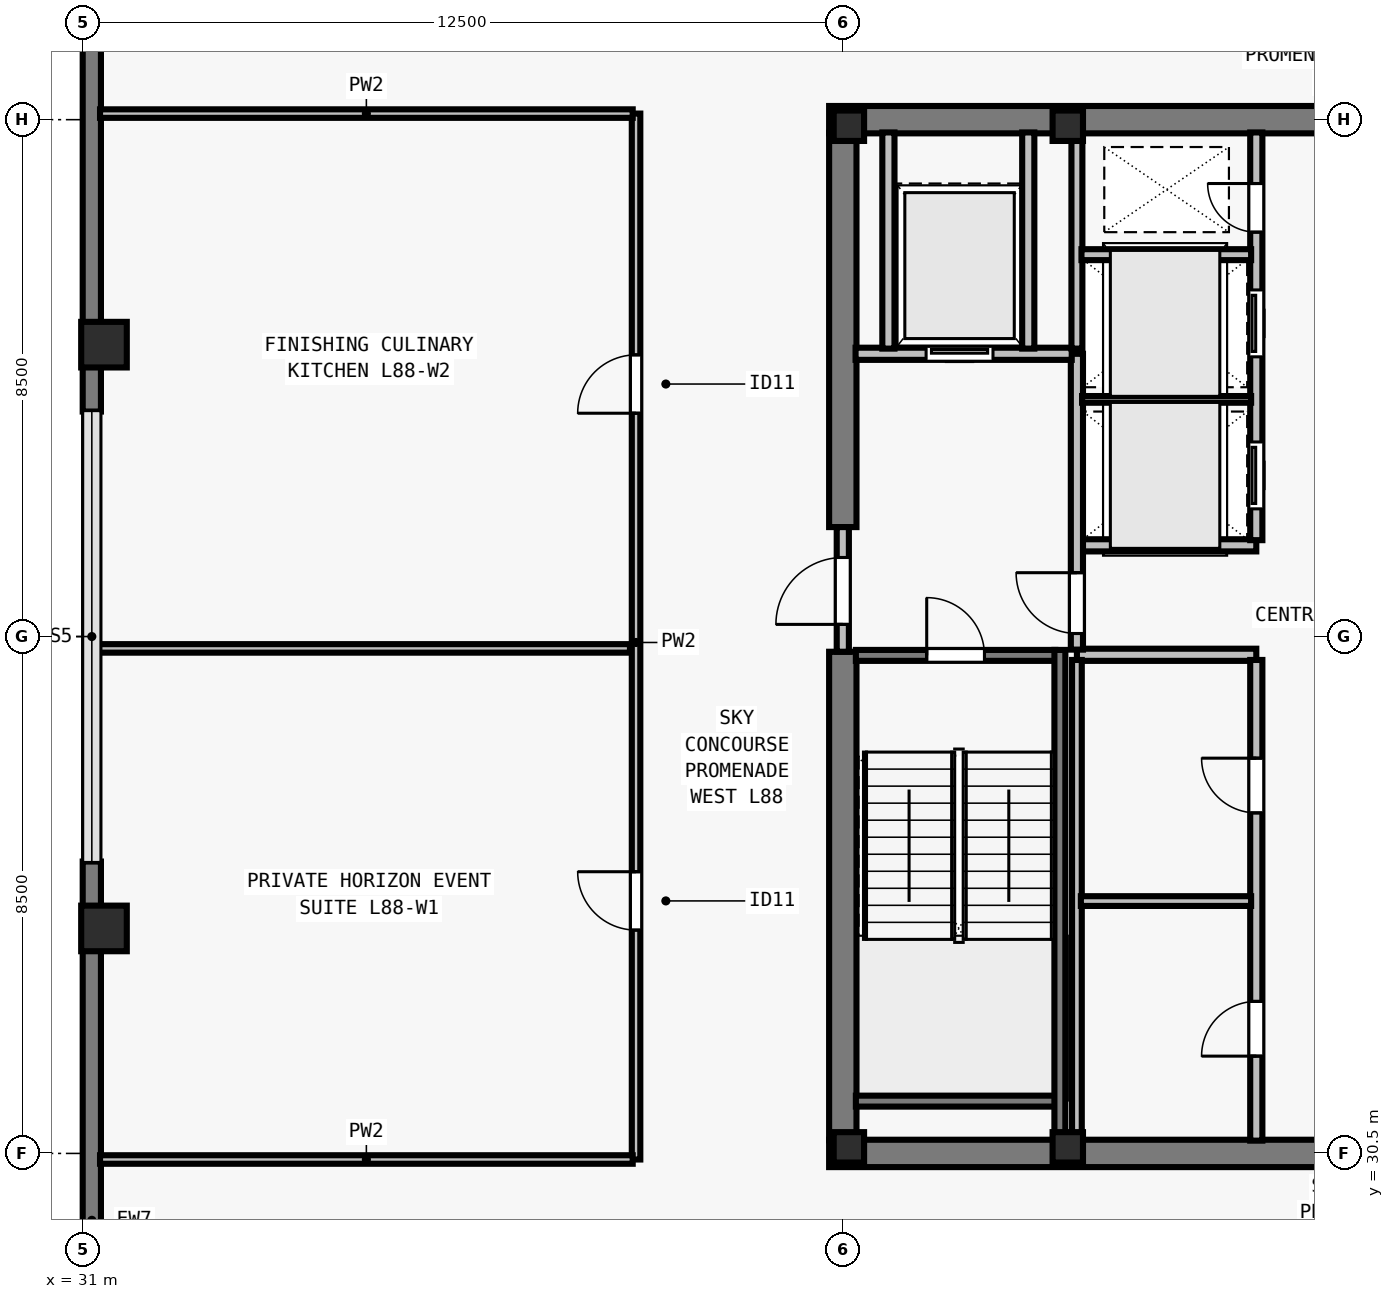
"""IFC4 building model, lengths in metres.
Left out: names, types, materials, properties, quantities, classifications, styles, units other than length and angle.
Written with IfcOpenShell. Run it as: python <this file> out.ifc"""

import sys

from ifc_helpers import new_model, si_unit, direction, frame, frame_2d, origin, origin_2d, place, context, subcontext, project, spatial, rectangle, i_section, extrude, element, fill, save


model = new_model("IFC4")
c1 = context("Model", 3, precision=1e-05, world=origin(), true_north=direction((0.0, 1.0)))
c2 = subcontext(c1, "Body", "Model", "MODEL_VIEW")
j1 = project(units=[si_unit("LENGTHUNIT", "METRE"), si_unit("PLANEANGLEUNIT", "RADIAN")], contexts=[c1])
p1 = place(None, origin())
s1 = spatial("IfcSite", under=j1, at=p1, CompositionType="ELEMENT")
p2 = place(p1, origin())
s2 = spatial("IfcBuilding", under=s1, at=p2, CompositionType="ELEMENT")
p3 = place(p2, frame((0.0, 0.0, 320.0)))
s3 = spatial("IfcBuildingStorey", under=s2, at=p3, CompositionType="ELEMENT", Elevation=320.0)
for number, where, z_axis, x_axis in (
    (1, (43.6, 30.6, 0.0), (0.0, 0.0, 1.0), (1.0, 0.0, 0.0)),
    (2, (47.2, 30.6, 0.0), (0.0, 0.0, 1.0), (1.0, 0.0, 0.0)),
    (3, (43.6, 47.4, 0.0), (0.0, 0.0, 1.0), (1.0, 0.0, 0.0)),
    (4, (47.2, 47.4, 0.0), (0.0, 0.0, 1.0), (1.0, 0.0, 0.0)),
):
    element("IfcColumn", number, at=place(p3, frame(where, z_axis=z_axis, x_axis=x_axis)), inside=s3, PredefinedType="COLUMN", context=c2, shape_type="SweptSolid", body=[
        extrude(i_section(OverallWidth=0.5, OverallDepth=0.5, WebThickness=0.028, FlangeThickness=0.045, at=origin_2d()), origin(), (0.0, 0.0, 1.0), 4.5),
    ])
for number, where, z_axis, x_axis in (
    (5, (31.35, 43.8, 0.0), (0.0, 0.0, 1.0), (0.0, 1.0, 0.0)),
    (6, (31.35, 34.2, 0.0), (0.0, 0.0, 1.0), (0.0, 1.0, 0.0)),
):
    element("IfcColumn", number, at=place(p3, frame(where, z_axis=z_axis, x_axis=x_axis)), inside=s3, PredefinedType="COLUMN", context=c2, shape_type="SweptSolid", body=[
        extrude(rectangle(XDim=0.75, YDim=0.75, at=origin_2d()), origin(), (0.0, 0.0, 1.0), 4.5),
    ])
p4 = place(p3, frame((31.15, 23.5, 0.0), z_axis=(0.0, 0.0, 1.0), x_axis=(0.0, 1.0, 0.0)))
e7 = element("IfcWall", 7, at=p4, inside=s3, PredefinedType="SOLIDWALL", context=c2, shape_type="SweptSolid", body=[
    extrude(rectangle(XDim=11.8, YDim=0.3, at=frame_2d((5.9, 0.0))), origin(), (0.0, 0.0, 1.0), 4.25),
])
p5 = place(p3, frame((31.15, 42.7, 0.0), z_axis=(0.0, 0.0, 1.0), x_axis=(0.0, 1.0, 0.0)))
e8 = element("IfcWall", 8, at=p5, inside=s3, PredefinedType="SOLIDWALL", context=c2, shape_type="SweptSolid", body=[
    extrude(rectangle(XDim=11.522, YDim=0.3, at=frame_2d((5.761, 0.0))), origin(), (0.0, 0.0, 1.0), 4.25),
])
for number, where, z_axis, x_axis in (
    (9, (43.275, 30.5, 0.0), (0.0, 0.0, 1.0), (1.0, 0.0, 0.0)),
    (10, (43.275, 47.5, 0.0), (0.0, 0.0, 1.0), (1.0, 0.0, 0.0)),
):
    element("IfcWall", number, at=place(p3, frame(where, z_axis=z_axis, x_axis=x_axis)), inside=s3, PredefinedType="SHEAR", context=c2, shape_type="SweptSolid", body=[
        extrude(rectangle(XDim=17.45, YDim=0.45, at=frame_2d((8.725, 0.0))), origin(), (0.0, 0.0, 1.0), 4.25),
    ])
p6 = place(p3, frame((43.5, 30.715, 0.0), z_axis=(0.0, 0.0, 1.0), x_axis=(0.0, 1.0, 0.0)))
e11 = element("IfcWall", 11, at=p6, inside=s3, PredefinedType="SHEAR", context=c2, shape_type="SweptSolid", body=[
    extrude(rectangle(XDim=8.035, YDim=0.45, at=frame_2d((4.018, 0.0))), origin(), (0.0, 0.0, 1.0), 4.25),
])
p7 = place(p3, frame((43.5, 40.8, 0.0), z_axis=(0.0, 0.0, 1.0), x_axis=(0.0, 1.0, 0.0)))
e12 = element("IfcWall", 12, at=p7, inside=s3, PredefinedType="SHEAR", context=c2, shape_type="SweptSolid", body=[
    extrude(rectangle(XDim=6.485, YDim=0.45, at=frame_2d((3.242, 0.0))), origin(), (0.0, 0.0, 1.0), 4.25),
])
for number, where, z_axis, x_axis in (
    (13, (47.35, 38.7, 0.0), (0.0, 0.0, 1.0), (1.0, 0.0, 0.0)),
    (14, (47.35, 40.5, 0.0), (0.0, 0.0, 1.0), (1.0, 0.0, 0.0)),
):
    element("IfcWall", number, at=place(p3, frame(where, z_axis=z_axis, x_axis=x_axis)), inside=s3, PredefinedType="SOLIDWALL", context=c2, shape_type="SweptSolid", body=[
        extrude(rectangle(XDim=2.95, YDim=0.2, at=frame_2d((1.475, 0.0))), origin(), (0.0, 0.0, 1.0), 4.25),
    ])
p8 = place(p3, frame((50.3, 30.71, 0.0), z_axis=(0.0, 0.0, 1.0), x_axis=(0.0, 1.0, 0.0)))
e15 = element("IfcWall", 15, at=p8, inside=s3, PredefinedType="SOLIDWALL", context=c2, shape_type="SweptSolid", body=[
    extrude(rectangle(XDim=7.905, YDim=0.2, at=frame_2d((3.953, 0.0))), origin(), (0.0, 0.0, 1.0), 4.25),
])
p9 = place(p8, frame((1.39, 0.0, 0.0)))
e16 = element("IfcOpeningElement", 16, at=p9, cuts=e15, PredefinedType="OPENING", context=c2, shape_type="SweptSolid", body=[
    extrude(rectangle(XDim=0.9, YDim=2.12, at=frame_2d((0.45, 1.06))), frame((0.0, 0.11, 0.0), z_axis=(0.0, -1.0, 0.0), x_axis=(1.0, 0.0, 0.0)), (0.0, 0.0, 1.0), 0.22),
])
p10 = place(p8, frame((5.39, 0.0, 0.0)))
e17 = element("IfcOpeningElement", 17, at=p10, cuts=e15, PredefinedType="OPENING", context=c2, shape_type="SweptSolid", body=[
    extrude(rectangle(XDim=0.9, YDim=2.12, at=frame_2d((0.45, 1.06))), frame((0.0, 0.11, 0.0), z_axis=(0.0, -1.0, 0.0), x_axis=(1.0, 0.0, 0.0)), (0.0, 0.0, 1.0), 0.22),
])
p11 = place(p3, frame((50.3, 40.585, 0.0), z_axis=(0.0, 0.0, 1.0), x_axis=(0.0, 1.0, 0.0)))
e18 = element("IfcWall", 18, at=p11, inside=s3, PredefinedType="SOLIDWALL", context=c2, shape_type="SweptSolid", body=[
    extrude(rectangle(XDim=6.705, YDim=0.2, at=frame_2d((3.353, 0.0))), origin(), (0.0, 0.0, 1.0), 4.25),
])
p12 = place(p11, frame((0.515, 0.0, 0.0)))
e19 = element("IfcOpeningElement", 19, at=p12, cuts=e18, PredefinedType="OPENING", context=c2, shape_type="SweptSolid", body=[
    extrude(rectangle(XDim=1.1, YDim=2.2, at=frame_2d((0.55, 1.1))), frame((0.0, 0.11, 0.0), z_axis=(0.0, -1.0, 0.0), x_axis=(1.0, 0.0, 0.0)), (0.0, 0.0, 1.0), 0.22),
])
p13 = place(p11, frame((3.015, 0.0, 0.0)))
e20 = element("IfcOpeningElement", 20, at=p13, cuts=e18, PredefinedType="OPENING", context=c2, shape_type="SweptSolid", body=[
    extrude(rectangle(XDim=1.1, YDim=2.2, at=frame_2d((0.55, 1.1))), frame((0.0, 0.11, 0.0), z_axis=(0.0, -1.0, 0.0), x_axis=(1.0, 0.0, 0.0)), (0.0, 0.0, 1.0), 0.22),
])
p14 = place(p11, frame((5.065, 0.0, 0.0)))
e21 = element("IfcOpeningElement", 21, at=p14, cuts=e18, PredefinedType="OPENING", context=c2, shape_type="SweptSolid", body=[
    extrude(rectangle(XDim=0.8, YDim=2.08, at=frame_2d((0.4, 1.04))), frame((0.0, 0.11, 0.0), z_axis=(0.0, -1.0, 0.0), x_axis=(1.0, 0.0, 0.0)), (0.0, 0.0, 1.0), 0.22),
])
p15 = place(p3, frame((43.5, 38.75, 0.0), z_axis=(0.0, 0.0, 1.0), x_axis=(0.0, 1.0, 0.0)))
e22 = element("IfcWall", 22, at=p15, inside=s3, PredefinedType="SOLIDWALL", context=c2, shape_type="SweptSolid", body=[
    extrude(rectangle(XDim=2.05, YDim=0.2, at=frame_2d((1.025, 0.0))), origin(), (0.0, 0.0, 1.0), 4.25),
])
p16 = place(p15, frame((0.45, 0.0, 0.0)))
e23 = element("IfcOpeningElement", 23, at=p16, cuts=e22, PredefinedType="OPENING", context=c2, shape_type="SweptSolid", body=[
    extrude(rectangle(XDim=1.1, YDim=2.15, at=frame_2d((0.55, 1.075))), frame((0.0, 0.11, 0.0), z_axis=(0.0, -1.0, 0.0), x_axis=(1.0, 0.0, 0.0)), (0.0, 0.0, 1.0), 0.22),
])
p17 = place(p3, frame((47.35, 38.785, 0.0), z_axis=(0.0, 0.0, 1.0), x_axis=(0.0, 1.0, 0.0)))
e24 = element("IfcWall", 24, at=p17, inside=s3, PredefinedType="SOLIDWALL", context=c2, shape_type="SweptSolid", body=[
    extrude(rectangle(XDim=4.865, YDim=0.2, at=frame_2d((2.433, 0.0))), origin(), (0.0, 0.0, 1.0), 4.25),
])
p18 = place(p17, frame((0.265, 0.0, 0.0)))
e25 = element("IfcOpeningElement", 25, at=p18, cuts=e24, PredefinedType="OPENING", context=c2, shape_type="SweptSolid", body=[
    extrude(rectangle(XDim=1.0, YDim=2.15, at=frame_2d((0.5, 1.075))), frame((0.0, 0.11, 0.0), z_axis=(0.0, -1.0, 0.0), x_axis=(1.0, 0.0, 0.0)), (0.0, 0.0, 1.0), 0.22),
])
p19 = place(p3, frame((43.71, 43.65, 0.0), z_axis=(0.0, 0.0, 1.0), x_axis=(1.0, 0.0, 0.0)))
e26 = element("IfcWall", 26, at=p19, inside=s3, PredefinedType="SOLIDWALL", context=c2, shape_type="SweptSolid", body=[
    extrude(rectangle(XDim=3.555, YDim=0.2, at=frame_2d((1.777, 0.0))), origin(), (0.0, 0.0, 1.0), 4.25),
])
p20 = place(p19, frame((1.16, 0.0, 0.0)))
e27 = element("IfcOpeningElement", 27, at=p20, cuts=e26, PredefinedType="OPENING", context=c2, shape_type="SweptSolid", body=[
    extrude(rectangle(XDim=1.1, YDim=2.2, at=frame_2d((0.55, 1.1))), frame((0.0, 0.11, 0.0), z_axis=(0.0, -1.0, 0.0), x_axis=(1.0, 0.0, 0.0)), (0.0, 0.0, 1.0), 0.22),
])
for number, where, z_axis, x_axis in (
    (28, (46.55, 43.735, 0.0), (0.0, 0.0, 1.0), (0.0, 1.0, 0.0)),
    (29, (44.25, 43.735, 0.0), (0.0, 0.0, 1.0), (0.0, 1.0, 0.0)),
):
    element("IfcWall", number, at=place(p3, frame(where, z_axis=z_axis, x_axis=x_axis)), inside=s3, PredefinedType="SOLIDWALL", context=c2, shape_type="SweptSolid", body=[
        extrude(rectangle(XDim=3.555, YDim=0.2, at=frame_2d((1.777, 0.0))), origin(), (0.0, 0.0, 1.0), 4.25),
    ])
p21 = place(p3, frame((47.35, 30.71, 0.0), z_axis=(0.0, 0.0, 1.0), x_axis=(0.0, 1.0, 0.0)))
e30 = element("IfcWall", 30, at=p21, inside=s3, PredefinedType="PARTITIONING", context=c2, shape_type="SweptSolid", body=[
    extrude(rectangle(XDim=7.905, YDim=0.16, at=frame_2d((3.953, 0.0))), origin(), (0.0, 0.0, 1.0), 4.25),
])
p22 = place(p3, frame((47.415, 34.65, 0.0), z_axis=(0.0, 0.0, 1.0), x_axis=(1.0, 0.0, 0.0)))
e31 = element("IfcWall", 31, at=p22, inside=s3, PredefinedType="PARTITIONING", context=c2, shape_type="SweptSolid", body=[
    extrude(rectangle(XDim=2.8, YDim=0.16, at=frame_2d((1.4, 0.0))), origin(), (0.0, 0.0, 1.0), 4.25),
])
p23 = place(p3, frame((47.35, 43.735, 0.0), z_axis=(0.0, 0.0, 1.0), x_axis=(0.0, 1.0, 0.0)))
e32 = element("IfcWall", 32, at=p23, inside=s3, PredefinedType="SOLIDWALL", context=c2, shape_type="SweptSolid", body=[
    extrude(rectangle(XDim=3.555, YDim=0.18, at=frame_2d((1.777, 0.0))), origin(), (0.0, 0.0, 1.0), 4.25),
])
p24 = place(p3, frame((47.435, 42.9, 0.0), z_axis=(0.0, 0.0, 1.0), x_axis=(1.0, 0.0, 0.0)))
e33 = element("IfcWall", 33, at=p24, inside=s3, PredefinedType="PARTITIONING", context=c2, shape_type="SweptSolid", body=[
    extrude(rectangle(XDim=2.78, YDim=0.11, at=frame_2d((1.39, 0.0))), origin(), (0.0, 0.0, 1.0), 4.25),
])
p25 = place(p3, frame((47.425, 45.28, 0.0), z_axis=(0.0, 0.0, 1.0), x_axis=(1.0, 0.0, 0.0)))
e34 = element("IfcWall", 34, at=p25, inside=s3, PredefinedType="SOLIDWALL", context=c2, shape_type="SweptSolid", body=[
    extrude(rectangle(XDim=2.79, YDim=0.18, at=frame_2d((1.395, 0.0))), origin(), (0.0, 0.0, 1.0), 4.25),
])
p26 = place(p3, frame((40.1, 30.4, 0.0), z_axis=(0.0, 0.0, 1.0), x_axis=(0.0, 1.0, 0.0)))
e35 = element("IfcWall", 35, at=p26, inside=s3, PredefinedType="PARTITIONING", context=c2, shape_type="SweptSolid", body=[
    extrude(rectangle(XDim=17.2, YDim=0.14, at=frame_2d((8.6, 0.0))), origin(), (0.0, 0.0, 1.0), 3.969),
])
p27 = place(p26, frame((3.772, 0.0, 0.0)))
e36 = element("IfcOpeningElement", 36, at=p27, cuts=e35, PredefinedType="OPENING", context=c2, shape_type="SweptSolid", body=[
    extrude(rectangle(XDim=0.96, YDim=2.12, at=frame_2d((0.48, 1.06))), frame((0.0, 0.08, 0.0), z_axis=(0.0, -1.0, 0.0), x_axis=(1.0, 0.0, 0.0)), (0.0, 0.0, 1.0), 0.16),
])
p28 = place(p26, frame((12.272, 0.0, 0.0)))
e37 = element("IfcOpeningElement", 37, at=p28, cuts=e35, PredefinedType="OPENING", context=c2, shape_type="SweptSolid", body=[
    extrude(rectangle(XDim=0.96, YDim=2.12, at=frame_2d((0.48, 1.06))), frame((0.0, 0.08, 0.0), z_axis=(0.0, -1.0, 0.0), x_axis=(1.0, 0.0, 0.0)), (0.0, 0.0, 1.0), 0.16),
])
for number, where, z_axis, x_axis in (
    (38, (31.285, 30.4, 0.0), (0.0, 0.0, 1.0), (1.0, 0.0, 0.0)),
    (39, (31.285, 47.6, 0.0), (0.0, 0.0, 1.0), (1.0, 0.0, 0.0)),
):
    element("IfcWall", number, at=place(p3, frame(where, z_axis=z_axis, x_axis=x_axis)), inside=s3, PredefinedType="PARTITIONING", context=c2, shape_type="SweptSolid", body=[
        extrude(rectangle(XDim=8.76, YDim=0.14, at=frame_2d((4.38, 0.0))), origin(), (0.0, 0.0, 1.0), 2.425),
    ])
p29 = place(p3, frame((31.17, 38.805, 0.0), z_axis=(0.0, 0.0, 1.0), x_axis=(1.0, 0.0, 0.0)))
e40 = element("IfcWall", 40, at=p29, inside=s3, PredefinedType="PARTITIONING", context=c2, shape_type="SweptSolid", body=[
    extrude(rectangle(XDim=8.83, YDim=0.14, at=frame_2d((4.415, 0.0))), origin(), (0.0, 0.0, 1.0), 4.25),
])
p30 = place(p3, frame((43.715, 38.69, 0.0), z_axis=(0.0, 0.0, 1.0), x_axis=(1.0, 0.0, 0.0)))
e41 = element("IfcWall", 41, at=p30, inside=s3, PredefinedType="SOLIDWALL", context=c2, shape_type="SweptSolid", body=[
    extrude(rectangle(XDim=3.28, YDim=0.18, at=frame_2d((1.64, 0.0))), origin(), (0.0, 0.0, 1.0), 4.25),
])
p31 = place(p30, frame((1.165, 0.0, 0.0)))
e42 = element("IfcOpeningElement", 42, at=p31, cuts=e41, PredefinedType="OPENING", context=c2, shape_type="SweptSolid", body=[
    extrude(rectangle(XDim=0.95, YDim=2.15, at=frame_2d((0.475, 1.075))), frame((0.0, 0.1, 0.0), z_axis=(0.0, -1.0, 0.0), x_axis=(1.0, 0.0, 0.0)), (0.0, 0.0, 1.0), 0.2),
])
p32 = place(p3, frame((43.715, 31.36, 0.0), z_axis=(0.0, 0.0, 1.0), x_axis=(1.0, 0.0, 0.0)))
e43 = element("IfcWall", 43, at=p32, inside=s3, PredefinedType="SOLIDWALL", context=c2, shape_type="SweptSolid", body=[
    extrude(rectangle(XDim=3.28, YDim=0.18, at=frame_2d((1.64, 0.0))), origin(), (0.0, 0.0, 1.0), 4.25),
])
p33 = place(p3, frame((47.07, 38.78, 0.0), z_axis=(0.0, 0.0, 1.0), x_axis=(0.0, -1.0, 0.0)))
e44 = element("IfcWall", 44, at=p33, inside=s3, PredefinedType="SOLIDWALL", context=c2, shape_type="SweptSolid", body=[
    extrude(rectangle(XDim=8.067, YDim=0.18, at=frame_2d((4.034, 0.0))), origin(), (0.0, 0.0, 1.0), 4.25),
])
p34 = place(p16, origin())
e45 = element("IfcDoor", 45, at=p34, inside=s3, OperationType="SINGLE_SWING_LEFT", PredefinedType="DOOR", context=c2, shape_type="SweptSolid", body=[
    extrude(rectangle(XDim=1.1, YDim=2.15, at=frame_2d((0.55, 1.075))), frame((0.0, 0.025, 0.0), z_axis=(0.0, -1.0, 0.0), x_axis=(1.0, 0.0, 0.0)), (0.0, 0.0, 1.0), 0.05),
])
fill(e23, e45)
p35 = place(p18, origin())
e46 = element("IfcDoor", 46, at=p35, inside=s3, OperationType="SINGLE_SWING_RIGHT", PredefinedType="DOOR", context=c2, shape_type="SweptSolid", body=[
    extrude(rectangle(XDim=1.0, YDim=2.15, at=frame_2d((0.5, 1.075))), frame((0.0, 0.025, 0.0), z_axis=(0.0, -1.0, 0.0), x_axis=(1.0, 0.0, 0.0)), (0.0, 0.0, 1.0), 0.05),
])
fill(e25, e46)
p36 = place(p20, origin())
e47 = element("IfcDoor", 47, at=p36, inside=s3, OperationType="SLIDING_TO_LEFT", PredefinedType="DOOR", context=c2, shape_type="SweptSolid", body=[
    extrude(rectangle(XDim=1.1, YDim=2.2, at=frame_2d((0.55, 1.1))), frame((0.0, 0.025, 0.0), z_axis=(0.0, -1.0, 0.0), x_axis=(1.0, 0.0, 0.0)), (0.0, 0.0, 1.0), 0.05),
])
fill(e27, e47)
p37 = place(p9, origin())
e48 = element("IfcDoor", 48, at=p37, inside=s3, OperationType="SINGLE_SWING_LEFT", PredefinedType="DOOR", context=c2, shape_type="SweptSolid", body=[
    extrude(rectangle(XDim=0.9, YDim=2.12, at=frame_2d((0.45, 1.06))), frame((0.0, 0.025, 0.0), z_axis=(0.0, -1.0, 0.0), x_axis=(1.0, 0.0, 0.0)), (0.0, 0.0, 1.0), 0.05),
])
fill(e16, e48)
p38 = place(p10, origin())
e49 = element("IfcDoor", 49, at=p38, inside=s3, OperationType="SINGLE_SWING_RIGHT", PredefinedType="DOOR", context=c2, shape_type="SweptSolid", body=[
    extrude(rectangle(XDim=0.9, YDim=2.12, at=frame_2d((0.45, 1.06))), frame((0.0, 0.025, 0.0), z_axis=(0.0, -1.0, 0.0), x_axis=(1.0, 0.0, 0.0)), (0.0, 0.0, 1.0), 0.05),
])
fill(e17, e49)
p39 = place(p12, origin())
e50 = element("IfcDoor", 50, at=p39, inside=s3, OperationType="SLIDING_TO_LEFT", PredefinedType="DOOR", context=c2, shape_type="SweptSolid", body=[
    extrude(rectangle(XDim=1.1, YDim=2.2, at=frame_2d((0.55, 1.1))), frame((0.0, 0.025, 0.0), z_axis=(0.0, -1.0, 0.0), x_axis=(1.0, 0.0, 0.0)), (0.0, 0.0, 1.0), 0.05),
])
fill(e19, e50)
p40 = place(p13, origin())
e51 = element("IfcDoor", 51, at=p40, inside=s3, OperationType="SLIDING_TO_LEFT", PredefinedType="DOOR", context=c2, shape_type="SweptSolid", body=[
    extrude(rectangle(XDim=1.1, YDim=2.2, at=frame_2d((0.55, 1.1))), frame((0.0, 0.025, 0.0), z_axis=(0.0, -1.0, 0.0), x_axis=(1.0, 0.0, 0.0)), (0.0, 0.0, 1.0), 0.05),
])
fill(e20, e51)
p41 = place(p14, origin())
e52 = element("IfcDoor", 52, at=p41, inside=s3, OperationType="SINGLE_SWING_RIGHT", PredefinedType="DOOR", context=c2, shape_type="SweptSolid", body=[
    extrude(rectangle(XDim=0.8, YDim=2.08, at=frame_2d((0.4, 1.04))), frame((0.0, 0.025, 0.0), z_axis=(0.0, -1.0, 0.0), x_axis=(1.0, 0.0, 0.0)), (0.0, 0.0, 1.0), 0.05),
])
fill(e21, e52)
p42 = place(p27, origin())
e53 = element("IfcDoor", 53, at=p42, inside=s3, OperationType="SINGLE_SWING_RIGHT", PredefinedType="DOOR", context=c2, shape_type="SweptSolid", body=[
    extrude(rectangle(XDim=0.96, YDim=2.12, at=frame_2d((0.48, 1.06))), frame((0.0, 0.025, 0.0), z_axis=(0.0, -1.0, 0.0), x_axis=(1.0, 0.0, 0.0)), (0.0, 0.0, 1.0), 0.05),
])
fill(e36, e53)
p43 = place(p28, origin())
e54 = element("IfcDoor", 54, at=p43, inside=s3, OperationType="SINGLE_SWING_LEFT", PredefinedType="DOOR", context=c2, shape_type="SweptSolid", body=[
    extrude(rectangle(XDim=0.96, YDim=2.12, at=frame_2d((0.48, 1.06))), frame((0.0, 0.025, 0.0), z_axis=(0.0, -1.0, 0.0), x_axis=(1.0, 0.0, 0.0)), (0.0, 0.0, 1.0), 0.05),
])
fill(e37, e54)
p44 = place(p31, origin())
e55 = element("IfcDoor", 55, at=p44, inside=s3, OperationType="SINGLE_SWING_LEFT", PredefinedType="DOOR", context=c2, shape_type="SweptSolid", body=[
    extrude(rectangle(XDim=0.95, YDim=2.15, at=frame_2d((0.475, 1.075))), frame((0.0, 0.025, 0.0), z_axis=(0.0, -1.0, 0.0), x_axis=(1.0, 0.0, 0.0)), (0.0, 0.0, 1.0), 0.05),
])
fill(e42, e55)
save(model, sys.argv[1])
